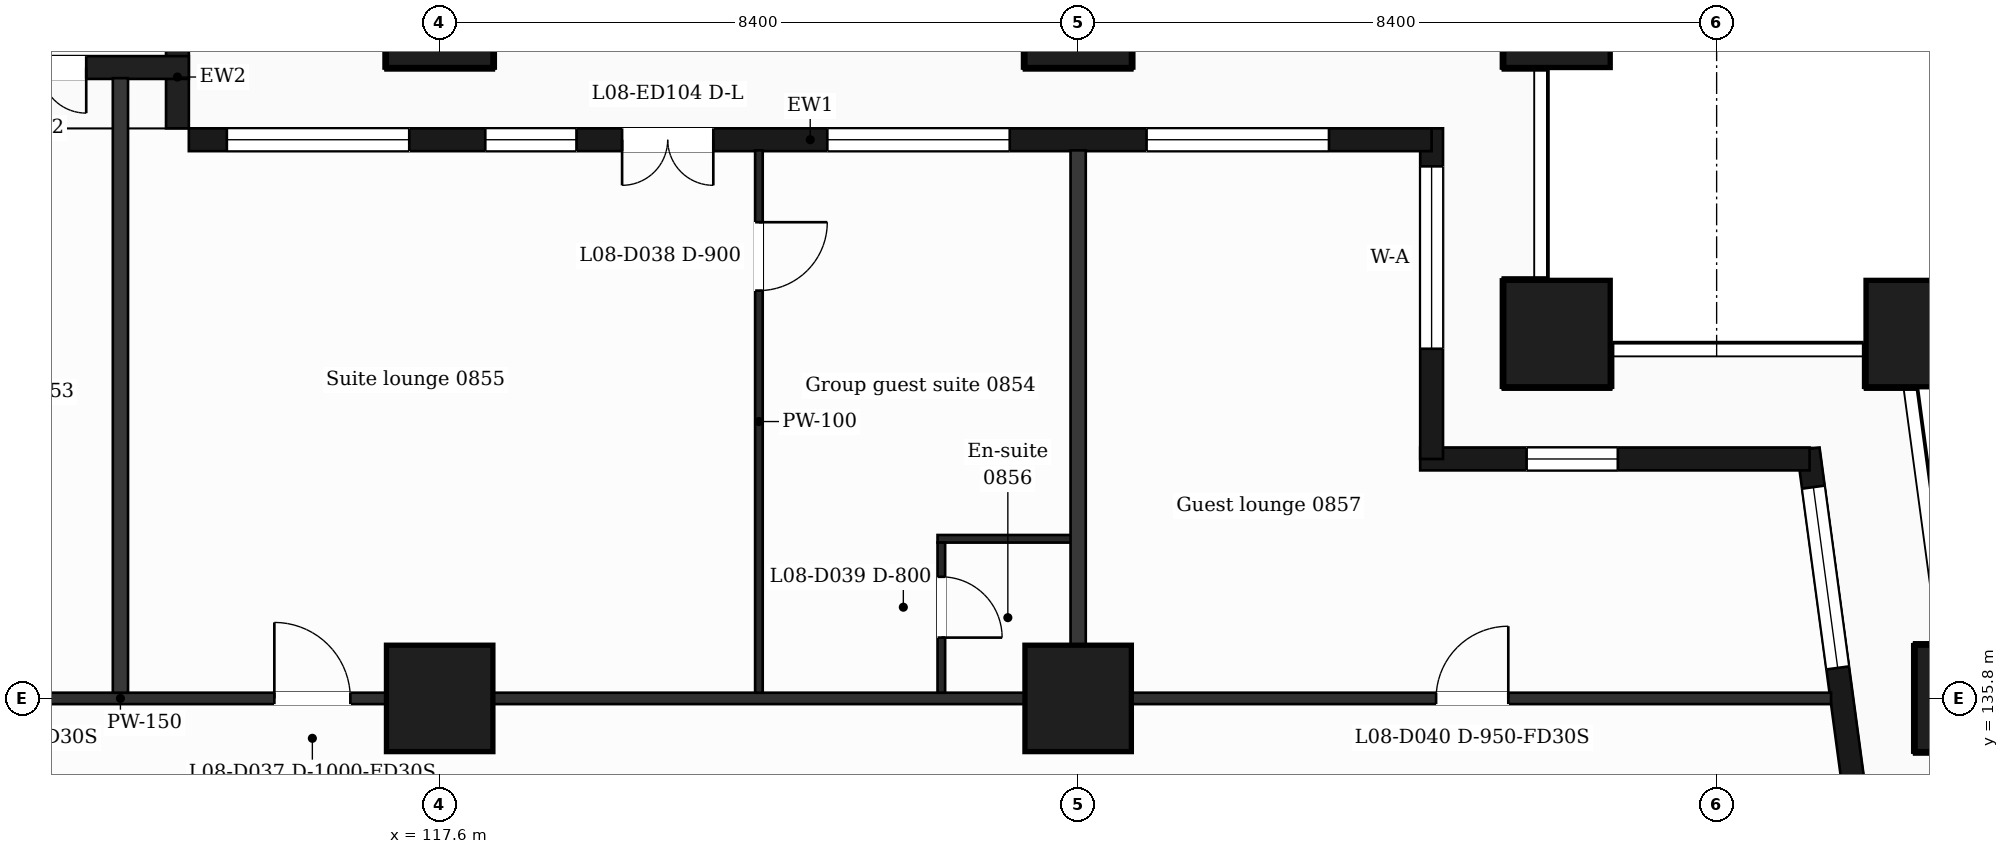
"""IFC4 building model, lengths in metres.
Left out: names, types, materials, properties, quantities, classifications, styles, units other than length and angle.
Written with IfcOpenShell. Run it as: python <this file> out.ifc"""

import sys

from ifc_helpers import new_model, si_unit, direction, frame, frame_2d, origin, origin_2d, place, context, subcontext, project, spatial, rectangle, extrude, element, fill, save


model = new_model("IFC4")
c1 = context("Model", 3, precision=1e-05, world=origin(), true_north=direction((0.0, 1.0)))
c2 = subcontext(c1, "Body", "Model", "MODEL_VIEW")
j1 = project(units=[si_unit("LENGTHUNIT", "METRE"), si_unit("PLANEANGLEUNIT", "RADIAN")], contexts=[c1])
p1 = place(None, origin())
s1 = spatial("IfcSite", under=j1, at=p1, CompositionType="ELEMENT")
p2 = place(p1, origin())
s2 = spatial("IfcBuilding", under=s1, at=p2, CompositionType="ELEMENT")
p3 = place(p2, frame((0.0, 0.0, 46.0)))
s3 = spatial("IfcBuildingStorey", under=s2, at=p3, CompositionType="ELEMENT", Elevation=46.0)
for number, where, z_axis, x_axis in (
    (1, (132.3, 140.6, 0.0), (0.0, 0.0, 1.0), (1.0, 0.0, 0.0)),
    (2, (137.065, 140.6, 0.0), (0.0, 0.0, 1.0), (1.0, 0.0, 0.0)),
    (3, (117.6, 135.8, 0.0), (0.0, 0.0, 1.0), (1.0, 0.0, 0.0)),
    (4, (126.0, 135.8, 0.0), (0.0, 0.0, 1.0), (1.0, 0.0, 0.0)),
    (5, (137.711, 135.8, 0.0), (0.0, 0.0, 1.0), (1.0, 0.0, 0.0)),
    (6, (117.6, 144.8, 0.0), (0.0, 0.0, 1.0), (1.0, 0.0, 0.0)),
    (7, (126.0, 144.8, 0.0), (0.0, 0.0, 1.0), (1.0, 0.0, 0.0)),
    (8, (132.3, 144.8, 0.0), (0.0, 0.0, 1.0), (1.0, 0.0, 0.0)),
):
    element("IfcColumn", number, at=place(p3, frame(where, z_axis=z_axis, x_axis=x_axis)), inside=s3, PredefinedType="COLUMN", context=c2, shape_type="SweptSolid", body=[
        extrude(rectangle(XDim=1.4, YDim=1.4, at=origin_2d()), origin(), (0.0, 0.0, 1.0), 3.5),
    ])
p4 = place(p3, frame((136.504, 132.4, 0.0), z_axis=(0.0, 0.0, 1.0), x_axis=(-0.133399697462, 0.99106231929, 0.0)))
e9 = element("IfcWall", 9, at=p4, inside=s3, PredefinedType="SOLIDWALL", context=c2, shape_type="SweptSolid", body=[
    extrude(rectangle(XDim=6.74, YDim=0.3, at=frame_2d((3.37, 0.0))), origin(), (0.0, 0.0, 1.0), 3.18),
])
p5 = place(p4, frame((1.115, 0.0, 0.0)))
e10 = element("IfcOpeningElement", 10, at=p5, cuts=e9, PredefinedType="OPENING", context=c2, shape_type="SweptSolid", body=[
    extrude(rectangle(XDim=1.2, YDim=2.4, at=frame_2d((0.6, 1.2))), frame((0.0, 0.16, 0.0), z_axis=(0.0, -1.0, 0.0), x_axis=(1.0, 0.0, 0.0)), (0.0, 0.0, 1.0), 0.32),
])
p6 = place(p4, frame((3.835, 0.0, 0.9)))
e11 = element("IfcOpeningElement", 11, at=p6, cuts=e9, PredefinedType="OPENING", context=c2, shape_type="SweptSolid", body=[
    extrude(rectangle(XDim=2.4, YDim=2.1, at=frame_2d((1.2, 1.05))), frame((0.0, 0.16, 0.0), z_axis=(0.0, -1.0, 0.0), x_axis=(1.0, 0.0, 0.0)), (0.0, 0.0, 1.0), 0.32),
])
p7 = place(p3, frame((135.623, 138.95, 0.0), z_axis=(0.0, 0.0, 1.0), x_axis=(-1.0, 0.0, 0.0)))
e12 = element("IfcWall", 12, at=p7, inside=s3, PredefinedType="SOLIDWALL", context=c2, shape_type="SweptSolid", body=[
    extrude(rectangle(XDim=5.123, YDim=0.3, at=frame_2d((2.561, 0.0))), origin(), (0.0, 0.0, 1.0), 3.18),
])
p8 = place(p7, frame((2.523, 0.0, 0.9)))
e13 = element("IfcOpeningElement", 13, at=p8, cuts=e12, PredefinedType="OPENING", context=c2, shape_type="SweptSolid", body=[
    extrude(rectangle(XDim=1.2, YDim=2.1, at=frame_2d((0.6, 1.05))), frame((0.0, 0.16, 0.0), z_axis=(0.0, -1.0, 0.0), x_axis=(1.0, 0.0, 0.0)), (0.0, 0.0, 1.0), 0.32),
])
p9 = place(p3, frame((130.65, 138.95, 0.0), z_axis=(0.0, 0.0, 1.0), x_axis=(0.0, 1.0, 0.0)))
e14 = element("IfcWall", 14, at=p9, inside=s3, PredefinedType="SOLIDWALL", context=c2, shape_type="SweptSolid", body=[
    extrude(rectangle(XDim=4.35, YDim=0.3, at=frame_2d((2.175, 0.0))), origin(), (0.0, 0.0, 1.0), 3.18),
])
p10 = place(p9, frame((1.45, 0.0, 0.9)))
e15 = element("IfcOpeningElement", 15, at=p10, cuts=e14, PredefinedType="OPENING", context=c2, shape_type="SweptSolid", body=[
    extrude(rectangle(XDim=2.4, YDim=2.1, at=frame_2d((1.2, 1.05))), frame((0.0, 0.16, 0.0), z_axis=(0.0, -1.0, 0.0), x_axis=(1.0, 0.0, 0.0)), (0.0, 0.0, 1.0), 0.32),
])
p11 = place(p3, frame((130.65, 143.15, 0.0), z_axis=(0.0, 0.0, 1.0), x_axis=(-1.0, 0.0, 0.0)))
e16 = element("IfcWall", 16, at=p11, inside=s3, PredefinedType="SOLIDWALL", context=c2, shape_type="SweptSolid", body=[
    extrude(rectangle(XDim=16.35, YDim=0.3, at=frame_2d((8.175, 0.0))), origin(), (0.0, 0.0, 1.0), 3.18),
])
p12 = place(p11, frame((1.35, 0.0, 0.9)))
e17 = element("IfcOpeningElement", 17, at=p12, cuts=e16, PredefinedType="OPENING", context=c2, shape_type="SweptSolid", body=[
    extrude(rectangle(XDim=2.4, YDim=2.1, at=frame_2d((1.2, 1.05))), frame((0.0, 0.16, 0.0), z_axis=(0.0, -1.0, 0.0), x_axis=(1.0, 0.0, 0.0)), (0.0, 0.0, 1.0), 0.32),
])
p13 = place(p11, frame((5.55, 0.0, 0.9)))
e18 = element("IfcOpeningElement", 18, at=p13, cuts=e16, PredefinedType="OPENING", context=c2, shape_type="SweptSolid", body=[
    extrude(rectangle(XDim=2.4, YDim=2.1, at=frame_2d((1.2, 1.05))), frame((0.0, 0.16, 0.0), z_axis=(0.0, -1.0, 0.0), x_axis=(1.0, 0.0, 0.0)), (0.0, 0.0, 1.0), 0.32),
])
p14 = place(p11, frame((9.45, 0.0, 0.0)))
e19 = element("IfcOpeningElement", 19, at=p14, cuts=e16, PredefinedType="OPENING", context=c2, shape_type="SweptSolid", body=[
    extrude(rectangle(XDim=1.2, YDim=2.4, at=frame_2d((0.6, 1.2))), frame((0.0, 0.16, 0.0), z_axis=(0.0, -1.0, 0.0), x_axis=(1.0, 0.0, 0.0)), (0.0, 0.0, 1.0), 0.32),
])
p15 = place(p11, frame((11.25, 0.0, 0.9)))
e20 = element("IfcOpeningElement", 20, at=p15, cuts=e16, PredefinedType="OPENING", context=c2, shape_type="SweptSolid", body=[
    extrude(rectangle(XDim=1.2, YDim=2.1, at=frame_2d((0.6, 1.05))), frame((0.0, 0.16, 0.0), z_axis=(0.0, -1.0, 0.0), x_axis=(1.0, 0.0, 0.0)), (0.0, 0.0, 1.0), 0.32),
])
p16 = place(p11, frame((13.45, 0.0, 0.9)))
e21 = element("IfcOpeningElement", 21, at=p16, cuts=e16, PredefinedType="OPENING", context=c2, shape_type="SweptSolid", body=[
    extrude(rectangle(XDim=2.4, YDim=2.1, at=frame_2d((1.2, 1.05))), frame((0.0, 0.16, 0.0), z_axis=(0.0, -1.0, 0.0), x_axis=(1.0, 0.0, 0.0)), (0.0, 0.0, 1.0), 0.32),
])
p17 = place(p3, frame((114.15, 143.3, 0.0), z_axis=(0.0, 0.0, 1.0), x_axis=(0.0, 1.0, 0.0)))
e22 = element("IfcWall", 22, at=p17, inside=s3, PredefinedType="SOLIDWALL", context=c2, shape_type="SweptSolid", body=[
    extrude(rectangle(XDim=1.35, YDim=0.3, at=frame_2d((0.675, 0.0))), origin(), (0.0, 0.0, 1.0), 3.18),
])
p18 = place(p3, frame((114.3, 144.1, 0.0), z_axis=(0.0, 0.0, 1.0), x_axis=(-1.0, 0.0, 0.0)))
e23 = element("IfcWall", 23, at=p18, inside=s3, PredefinedType="SOLIDWALL", context=c2, shape_type="SweptSolid", body=[
    extrude(rectangle(XDim=3.9, YDim=0.3, at=frame_2d((1.95, 0.0))), origin(), (0.0, 0.0, 1.0), 3.18),
])
p19 = place(p18, frame((1.35, 0.0, 0.0)))
e24 = element("IfcOpeningElement", 24, at=p19, cuts=e23, PredefinedType="OPENING", context=c2, shape_type="SweptSolid", body=[
    extrude(rectangle(XDim=1.2, YDim=2.4, at=frame_2d((0.6, 1.2))), frame((0.0, 0.16, 0.0), z_axis=(0.0, -1.0, 0.0), x_axis=(1.0, 0.0, 0.0)), (0.0, 0.0, 1.0), 0.32),
])
p20 = place(p3, frame((90.895, 135.8, 0.0), z_axis=(0.0, 0.0, 1.0), x_axis=(1.0, 0.0, 0.0)))
e25 = element("IfcWall", 25, at=p20, inside=s3, PredefinedType="PARTITIONING", context=c2, shape_type="SweptSolid", body=[
    extrude(rectangle(XDim=45.011, YDim=0.15, at=frame_2d((22.505, 0.0))), origin(), (0.0, 0.0, 1.0), 3.18),
])
p21 = place(p20, frame((7.235, 0.0, 0.0)))
e26 = element("IfcOpeningElement", 26, at=p21, cuts=e25, PredefinedType="OPENING", context=c2, shape_type="SweptSolid", body=[
    extrude(rectangle(XDim=1.0, YDim=2.1, at=frame_2d((0.5, 1.05))), frame((0.0, 0.085, 0.0), z_axis=(0.0, -1.0, 0.0), x_axis=(1.0, 0.0, 0.0)), (0.0, 0.0, 1.0), 0.17),
])
p22 = place(p20, frame((12.73, 0.0, 0.0)))
e27 = element("IfcOpeningElement", 27, at=p22, cuts=e25, PredefinedType="OPENING", context=c2, shape_type="SweptSolid", body=[
    extrude(rectangle(XDim=0.95, YDim=2.1, at=frame_2d((0.475, 1.05))), frame((0.0, 0.085, 0.0), z_axis=(0.0, -1.0, 0.0), x_axis=(1.0, 0.0, 0.0)), (0.0, 0.0, 1.0), 0.17),
])
p23 = place(p20, frame((20.185, 0.0, 0.0)))
e28 = element("IfcOpeningElement", 28, at=p23, cuts=e25, PredefinedType="OPENING", context=c2, shape_type="SweptSolid", body=[
    extrude(rectangle(XDim=0.95, YDim=2.1, at=frame_2d((0.475, 1.05))), frame((0.0, 0.085, 0.0), z_axis=(0.0, -1.0, 0.0), x_axis=(1.0, 0.0, 0.0)), (0.0, 0.0, 1.0), 0.17),
])
p24 = place(p20, frame((24.531, 0.0, 0.0)))
e29 = element("IfcOpeningElement", 29, at=p24, cuts=e25, PredefinedType="OPENING", context=c2, shape_type="SweptSolid", body=[
    extrude(rectangle(XDim=1.0, YDim=2.1, at=frame_2d((0.5, 1.05))), frame((0.0, 0.085, 0.0), z_axis=(0.0, -1.0, 0.0), x_axis=(1.0, 0.0, 0.0)), (0.0, 0.0, 1.0), 0.17),
])
p25 = place(p20, frame((39.814, 0.0, 0.0)))
e30 = element("IfcOpeningElement", 30, at=p25, cuts=e25, PredefinedType="OPENING", context=c2, shape_type="SweptSolid", body=[
    extrude(rectangle(XDim=0.95, YDim=2.1, at=frame_2d((0.475, 1.05))), frame((0.0, 0.085, 0.0), z_axis=(0.0, -1.0, 0.0), x_axis=(1.0, 0.0, 0.0)), (0.0, 0.0, 1.0), 0.17),
])
p26 = place(p3, frame((124.15, 137.9, 0.0), z_axis=(0.0, 0.0, 1.0), x_axis=(1.0, 0.0, 0.0)))
e31 = element("IfcWall", 31, at=p26, inside=s3, PredefinedType="PARTITIONING", context=c2, shape_type="SweptSolid", body=[
    extrude(rectangle(XDim=1.85, YDim=0.1, at=frame_2d((0.925, 0.0))), origin(), (0.0, 0.0, 1.0), 3.18),
])
p27 = place(p3, frame((113.4, 135.875, 0.0), z_axis=(0.0, 0.0, 1.0), x_axis=(0.0, 1.0, 0.0)))
e32 = element("IfcWall", 32, at=p27, inside=s3, PredefinedType="PARTITIONING", context=c2, shape_type="SweptSolid", body=[
    extrude(rectangle(XDim=8.085, YDim=0.2, at=frame_2d((4.042, 0.0))), origin(), (0.0, 0.0, 1.0), 3.18),
])
p28 = place(p3, frame((121.8, 135.875, 0.0), z_axis=(0.0, 0.0, 1.0), x_axis=(0.0, 1.0, 0.0)))
e33 = element("IfcWall", 33, at=p28, inside=s3, PredefinedType="PARTITIONING", context=c2, shape_type="SweptSolid", body=[
    extrude(rectangle(XDim=7.135, YDim=0.1, at=frame_2d((3.567, 0.0))), origin(), (0.0, 0.0, 1.0), 3.18),
])
p29 = place(p28, frame((5.29, 0.0, 0.0)))
e34 = element("IfcOpeningElement", 34, at=p29, cuts=e33, PredefinedType="OPENING", context=c2, shape_type="SweptSolid", body=[
    extrude(rectangle(XDim=0.9, YDim=2.1, at=frame_2d((0.45, 1.05))), frame((0.0, 0.06, 0.0), z_axis=(0.0, -1.0, 0.0), x_axis=(1.0, 0.0, 0.0)), (0.0, 0.0, 1.0), 0.12),
])
p30 = place(p3, frame((124.2, 135.875, 0.0), z_axis=(0.0, 0.0, 1.0), x_axis=(0.0, 1.0, 0.0)))
e35 = element("IfcWall", 35, at=p30, inside=s3, PredefinedType="PARTITIONING", context=c2, shape_type="SweptSolid", body=[
    extrude(rectangle(XDim=1.975, YDim=0.1, at=frame_2d((0.988, 0.0))), origin(), (0.0, 0.0, 1.0), 3.18),
])
p31 = place(p30, frame((0.725, 0.0, 0.0)))
e36 = element("IfcOpeningElement", 36, at=p31, cuts=e35, PredefinedType="OPENING", context=c2, shape_type="SweptSolid", body=[
    extrude(rectangle(XDim=0.8, YDim=2.1, at=frame_2d((0.4, 1.05))), frame((0.0, 0.06, 0.0), z_axis=(0.0, -1.0, 0.0), x_axis=(1.0, 0.0, 0.0)), (0.0, 0.0, 1.0), 0.12),
])
p32 = place(p3, frame((126.0, 135.875, 0.0), z_axis=(0.0, 0.0, 1.0), x_axis=(0.0, 1.0, 0.0)))
e37 = element("IfcWall", 37, at=p32, inside=s3, PredefinedType="PARTITIONING", context=c2, shape_type="SweptSolid", body=[
    extrude(rectangle(XDim=7.135, YDim=0.2, at=frame_2d((3.567, 0.0))), origin(), (0.0, 0.0, 1.0), 3.18),
])
p33 = place(p6, origin())
e38 = element("IfcWindow", 38, at=p33, inside=s3, PartitioningType="SINGLE_PANEL", PredefinedType="WINDOW", context=c2, shape_type="SweptSolid", body=[
    extrude(rectangle(XDim=2.4, YDim=2.1, at=frame_2d((1.2, 1.05))), frame((0.0, 0.03, 0.0), z_axis=(0.0, -1.0, 0.0), x_axis=(1.0, 0.0, 0.0)), (0.0, 0.0, 1.0), 0.06),
])
fill(e11, e38)
p34 = place(p8, origin())
e39 = element("IfcWindow", 39, at=p34, inside=s3, PartitioningType="SINGLE_PANEL", PredefinedType="WINDOW", context=c2, shape_type="SweptSolid", body=[
    extrude(rectangle(XDim=1.2, YDim=2.1, at=frame_2d((0.6, 1.05))), frame((0.0, 0.03, 0.0), z_axis=(0.0, -1.0, 0.0), x_axis=(1.0, 0.0, 0.0)), (0.0, 0.0, 1.0), 0.06),
])
fill(e13, e39)
p35 = place(p10, origin())
e40 = element("IfcWindow", 40, at=p35, inside=s3, PartitioningType="SINGLE_PANEL", PredefinedType="WINDOW", context=c2, shape_type="SweptSolid", body=[
    extrude(rectangle(XDim=2.4, YDim=2.1, at=frame_2d((1.2, 1.05))), frame((0.0, 0.03, 0.0), z_axis=(0.0, -1.0, 0.0), x_axis=(1.0, 0.0, 0.0)), (0.0, 0.0, 1.0), 0.06),
])
fill(e15, e40)
p36 = place(p12, origin())
e41 = element("IfcWindow", 41, at=p36, inside=s3, PartitioningType="SINGLE_PANEL", PredefinedType="WINDOW", context=c2, shape_type="SweptSolid", body=[
    extrude(rectangle(XDim=2.4, YDim=2.1, at=frame_2d((1.2, 1.05))), frame((0.0, 0.03, 0.0), z_axis=(0.0, -1.0, 0.0), x_axis=(1.0, 0.0, 0.0)), (0.0, 0.0, 1.0), 0.06),
])
fill(e17, e41)
p37 = place(p13, origin())
e42 = element("IfcWindow", 42, at=p37, inside=s3, PartitioningType="SINGLE_PANEL", PredefinedType="WINDOW", context=c2, shape_type="SweptSolid", body=[
    extrude(rectangle(XDim=2.4, YDim=2.1, at=frame_2d((1.2, 1.05))), frame((0.0, 0.03, 0.0), z_axis=(0.0, -1.0, 0.0), x_axis=(1.0, 0.0, 0.0)), (0.0, 0.0, 1.0), 0.06),
])
fill(e18, e42)
p38 = place(p14, origin())
e43 = element("IfcDoor", 43, at=p38, inside=s3, OperationType="DOUBLE_DOOR_SINGLE_SWING", PredefinedType="DOOR", context=c2, shape_type="SweptSolid", body=[
    extrude(rectangle(XDim=1.2, YDim=2.4, at=frame_2d((0.6, 1.2))), frame((0.0, 0.025, 0.0), z_axis=(0.0, -1.0, 0.0), x_axis=(1.0, 0.0, 0.0)), (0.0, 0.0, 1.0), 0.05),
])
fill(e19, e43)
p39 = place(p15, origin())
e44 = element("IfcWindow", 44, at=p39, inside=s3, PartitioningType="SINGLE_PANEL", PredefinedType="WINDOW", context=c2, shape_type="SweptSolid", body=[
    extrude(rectangle(XDim=1.2, YDim=2.1, at=frame_2d((0.6, 1.05))), frame((0.0, 0.03, 0.0), z_axis=(0.0, -1.0, 0.0), x_axis=(1.0, 0.0, 0.0)), (0.0, 0.0, 1.0), 0.06),
])
fill(e20, e44)
p40 = place(p16, origin())
e45 = element("IfcWindow", 45, at=p40, inside=s3, PartitioningType="SINGLE_PANEL", PredefinedType="WINDOW", context=c2, shape_type="SweptSolid", body=[
    extrude(rectangle(XDim=2.4, YDim=2.1, at=frame_2d((1.2, 1.05))), frame((0.0, 0.03, 0.0), z_axis=(0.0, -1.0, 0.0), x_axis=(1.0, 0.0, 0.0)), (0.0, 0.0, 1.0), 0.06),
])
fill(e21, e45)
p41 = place(p19, origin())
e46 = element("IfcDoor", 46, at=p41, inside=s3, OperationType="DOUBLE_DOOR_SINGLE_SWING", PredefinedType="DOOR", context=c2, shape_type="SweptSolid", body=[
    extrude(rectangle(XDim=1.2, YDim=2.4, at=frame_2d((0.6, 1.2))), frame((0.0, 0.025, 0.0), z_axis=(0.0, -1.0, 0.0), x_axis=(1.0, 0.0, 0.0)), (0.0, 0.0, 1.0), 0.05),
])
fill(e24, e46)
p42 = place(p24, origin())
e47 = element("IfcDoor", 47, at=p42, inside=s3, OperationType="SINGLE_SWING_LEFT", PredefinedType="DOOR", context=c2, shape_type="SweptSolid", body=[
    extrude(rectangle(XDim=1.0, YDim=2.1, at=frame_2d((0.5, 1.05))), frame((0.0, 0.025, 0.0), z_axis=(0.0, -1.0, 0.0), x_axis=(1.0, 0.0, 0.0)), (0.0, 0.0, 1.0), 0.05),
])
fill(e29, e47)
p43 = place(p29, origin())
e48 = element("IfcDoor", 48, at=p43, inside=s3, OperationType="SINGLE_SWING_RIGHT", PredefinedType="DOOR", context=c2, shape_type="SweptSolid", body=[
    extrude(rectangle(XDim=0.9, YDim=2.1, at=frame_2d((0.45, 1.05))), frame((0.0, 0.025, 0.0), z_axis=(0.0, -1.0, 0.0), x_axis=(1.0, 0.0, 0.0)), (0.0, 0.0, 1.0), 0.05),
])
fill(e34, e48)
p44 = place(p31, origin())
e49 = element("IfcDoor", 49, at=p44, inside=s3, OperationType="SINGLE_SWING_LEFT", PredefinedType="DOOR", context=c2, shape_type="SweptSolid", body=[
    extrude(rectangle(XDim=0.8, YDim=2.1, at=frame_2d((0.4, 1.05))), frame((0.0, 0.025, 0.0), z_axis=(0.0, -1.0, 0.0), x_axis=(1.0, 0.0, 0.0)), (0.0, 0.0, 1.0), 0.05),
])
fill(e36, e49)
p45 = place(p25, origin())
e50 = element("IfcDoor", 50, at=p45, inside=s3, OperationType="SINGLE_SWING_RIGHT", PredefinedType="DOOR", context=c2, shape_type="SweptSolid", body=[
    extrude(rectangle(XDim=0.95, YDim=2.1, at=frame_2d((0.475, 1.05))), frame((0.0, 0.025, 0.0), z_axis=(0.0, -1.0, 0.0), x_axis=(1.0, 0.0, 0.0)), (0.0, 0.0, 1.0), 0.05),
])
fill(e30, e50)
save(model, sys.argv[1])
